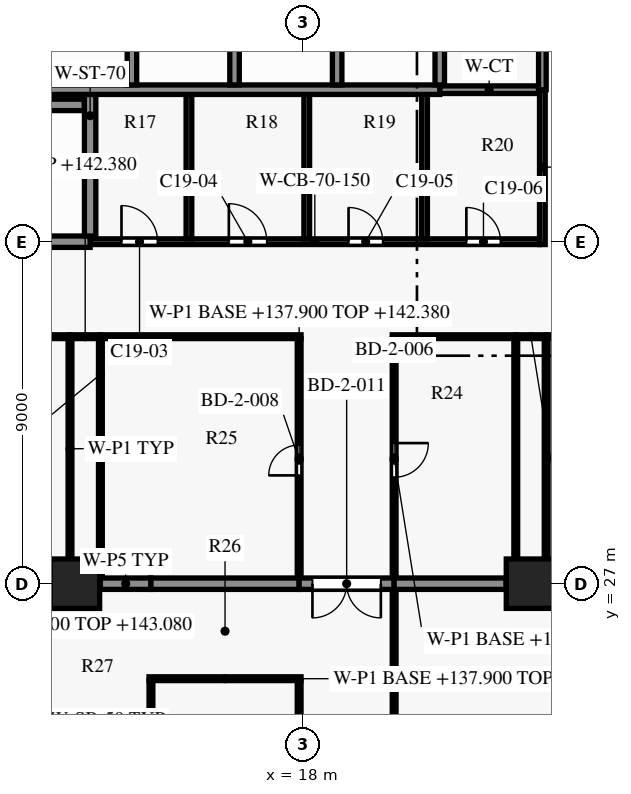
"""IFC4 building model, lengths in metres.
Left out: names, types, materials, properties, quantities, classifications, styles, units other than length and angle.
Written with IfcOpenShell. Run it as: python <this file> out.ifc"""

import sys

from ifc_helpers import new_model, si_unit, direction, frame, frame_2d, origin, origin_2d, place, context, subcontext, project, spatial, rectangle, extrude, element, fill, save


model = new_model("IFC4")
c1 = context("Model", 3, precision=1e-05, world=origin(), true_north=direction((0.0, 1.0)))
c2 = subcontext(c1, "Body", "Model", "MODEL_VIEW")
j1 = project(units=[si_unit("LENGTHUNIT", "METRE"), si_unit("PLANEANGLEUNIT", "RADIAN")], contexts=[c1])
p1 = place(None, origin())
s1 = spatial("IfcSite", under=j1, at=p1, CompositionType="ELEMENT")
p2 = place(p1, origin())
s2 = spatial("IfcBuilding", under=s1, at=p2, CompositionType="ELEMENT")
p3 = place(p2, frame((0.0, 0.0, 137.9)))
s3 = spatial("IfcBuildingStorey", under=s2, at=p3, CompositionType="ELEMENT", Elevation=137.9)
for number, where, z_axis, x_axis in (
    (1, (12.0, 27.0, 0.0), (0.0, 0.0, 1.0), (1.0, 0.0, 0.0)),
    (2, (24.0, 27.0, 0.0), (0.0, 0.0, 1.0), (1.0, 0.0, 0.0)),
):
    element("IfcColumn", number, at=place(p3, frame(where, z_axis=z_axis, x_axis=x_axis)), inside=s3, PredefinedType="COLUMN", context=c2, shape_type="SweptSolid", body=[
        extrude(rectangle(XDim=1.3, YDim=1.3, at=origin_2d()), origin(), (0.0, 0.0, 1.0), 5.5),
    ])
p4 = place(p3, frame((12.4, 36.0, 0.0), z_axis=(0.0, 0.0, 1.0), x_axis=(1.0, 0.0, 0.0)))
e3 = element("IfcWall", 3, at=p4, inside=s3, PredefinedType="SHEAR", context=c2, shape_type="SweptSolid", body=[
    extrude(rectangle(XDim=11.825, YDim=0.15, at=frame_2d((5.913, 0.0))), origin(), (0.0, 0.0, 1.0), 5.2),
])
p5 = place(p4, frame((0.825, 0.0, 0.0)))
e4 = element("IfcOpeningElement", 4, at=p5, cuts=e3, PredefinedType="OPENING", context=c2, shape_type="SweptSolid", body=[
    extrude(rectangle(XDim=0.95, YDim=2.1, at=frame_2d((0.475, 1.05))), frame((0.0, 0.085, 0.0), z_axis=(0.0, -1.0, 0.0), x_axis=(1.0, 0.0, 0.0)), (0.0, 0.0, 1.0), 0.17),
])
p6 = place(p4, frame((3.65, 0.0, 0.0)))
e5 = element("IfcOpeningElement", 5, at=p6, cuts=e3, PredefinedType="OPENING", context=c2, shape_type="SweptSolid", body=[
    extrude(rectangle(XDim=1.0, YDim=2.1, at=frame_2d((0.5, 1.05))), frame((0.0, 0.085, 0.0), z_axis=(0.0, -1.0, 0.0), x_axis=(1.0, 0.0, 0.0)), (0.0, 0.0, 1.0), 0.17),
])
p7 = place(p4, frame((6.8, 0.0, 0.0)))
e6 = element("IfcOpeningElement", 6, at=p7, cuts=e3, PredefinedType="OPENING", context=c2, shape_type="SweptSolid", body=[
    extrude(rectangle(XDim=0.9, YDim=2.1, at=frame_2d((0.45, 1.05))), frame((0.0, 0.085, 0.0), z_axis=(0.0, -1.0, 0.0), x_axis=(1.0, 0.0, 0.0)), (0.0, 0.0, 1.0), 0.17),
])
p8 = place(p4, frame((9.9, 0.0, 0.0)))
e7 = element("IfcOpeningElement", 7, at=p8, cuts=e3, PredefinedType="OPENING", context=c2, shape_type="SweptSolid", body=[
    extrude(rectangle(XDim=0.9, YDim=2.1, at=frame_2d((0.45, 1.05))), frame((0.0, 0.085, 0.0), z_axis=(0.0, -1.0, 0.0), x_axis=(1.0, 0.0, 0.0)), (0.0, 0.0, 1.0), 0.17),
])
p9 = place(p3, frame((4.55, 36.0, 0.0), z_axis=(0.0, 0.0, 1.0), x_axis=(1.0, 0.0, 0.0)))
e8 = element("IfcWall", 8, at=p9, inside=s3, PredefinedType="SHEAR", context=c2, shape_type="SweptSolid", body=[
    extrude(rectangle(XDim=7.85, YDim=0.3, at=frame_2d((3.925, 0.0))), origin(), (0.0, 0.0, 1.0), 5.2),
])
p10 = place(p9, frame((0.15, 0.0, 0.0)))
e9 = element("IfcOpeningElement", 9, at=p10, cuts=e8, PredefinedType="OPENING", context=c2, shape_type="SweptSolid", body=[
    extrude(rectangle(XDim=1.5, YDim=2.2, at=frame_2d((0.75, 1.1))), frame((0.0, 0.16, 0.0), z_axis=(0.0, -1.0, 0.0), x_axis=(1.0, 0.0, 0.0)), (0.0, 0.0, 1.0), 0.32),
])
p11 = place(p3, frame((4.55, 39.6, 0.0), z_axis=(0.0, 0.0, 1.0), x_axis=(1.0, 0.0, 0.0)))
e10 = element("IfcWall", 10, at=p11, inside=s3, PredefinedType="SHEAR", context=c2, shape_type="SweptSolid", body=[
    extrude(rectangle(XDim=7.7, YDim=0.3, at=frame_2d((3.85, 0.0))), origin(), (0.0, 0.0, 1.0), 5.2),
])
p12 = place(p3, frame((21.6, 40.0, 0.0), z_axis=(0.0, 0.0, 1.0), x_axis=(1.0, 0.0, 0.0)))
e11 = element("IfcWall", 11, at=p12, inside=s3, PredefinedType="PARTITIONING", context=c2, shape_type="SweptSolid", body=[
    extrude(rectangle(XDim=2.6, YDim=0.2, at=frame_2d((1.3, 0.0))), origin(), (0.0, 0.0, 1.0), 5.2),
])
p13 = place(p3, frame((0.125, 40.0, 0.0), z_axis=(0.0, 0.0, 1.0), x_axis=(1.0, 0.0, 0.0)))
e12 = element("IfcWall", 12, at=p13, inside=s3, PredefinedType="SHEAR", context=c2, shape_type="SweptSolid", body=[
    extrude(rectangle(XDim=21.475, YDim=0.25, at=frame_2d((10.738, 0.0))), origin(), (0.0, 0.0, 1.0), 5.2),
])
p14 = place(p3, frame((12.4, 36.15, 0.0), z_axis=(0.0, 0.0, 1.0), x_axis=(0.0, 1.0, 0.0)))
e13 = element("IfcWall", 13, at=p14, inside=s3, PredefinedType="SHEAR", context=c2, shape_type="SweptSolid", body=[
    extrude(rectangle(XDim=3.725, YDim=0.3, at=frame_2d((1.863, 0.0))), origin(), (0.0, 0.0, 1.0), 5.2),
])
p15 = place(p3, frame((13.5, 40.125, 0.0), z_axis=(0.0, 0.0, 1.0), x_axis=(0.0, 1.0, 0.0)))
e14 = element("IfcWall", 14, at=p15, inside=s3, PredefinedType="SHEAR", context=c2, shape_type="SweptSolid", body=[
    extrude(rectangle(XDim=2.95, YDim=0.25, at=frame_2d((1.475, 0.0))), origin(), (0.0, 0.0, 1.0), 5.2),
])
p16 = place(p3, frame((15.0, 36.075, 0.0), z_axis=(0.0, 0.0, 1.0), x_axis=(0.0, 1.0, 0.0)))
e15 = element("IfcWall", 15, at=p16, inside=s3, PredefinedType="PARTITIONING", context=c2, shape_type="SweptSolid", body=[
    extrude(rectangle(XDim=3.8, YDim=0.15, at=frame_2d((1.9, 0.0))), origin(), (0.0, 0.0, 1.0), 5.2),
])
p17 = place(p3, frame((16.2, 40.125, 0.0), z_axis=(0.0, 0.0, 1.0), x_axis=(0.0, 1.0, 0.0)))
e16 = element("IfcWall", 16, at=p17, inside=s3, PredefinedType="SHEAR", context=c2, shape_type="SweptSolid", body=[
    extrude(rectangle(XDim=2.95, YDim=0.25, at=frame_2d((1.475, 0.0))), origin(), (0.0, 0.0, 1.0), 5.2),
])
p18 = place(p3, frame((18.1, 36.075, 0.0), z_axis=(0.0, 0.0, 1.0), x_axis=(0.0, 1.0, 0.0)))
e17 = element("IfcWall", 17, at=p18, inside=s3, PredefinedType="PARTITIONING", context=c2, shape_type="SweptSolid", body=[
    extrude(rectangle(XDim=3.8, YDim=0.15, at=frame_2d((1.9, 0.0))), origin(), (0.0, 0.0, 1.0), 5.2),
])
p19 = place(p3, frame((18.9, 40.125, 0.0), z_axis=(0.0, 0.0, 1.0), x_axis=(0.0, 1.0, 0.0)))
e18 = element("IfcWall", 18, at=p19, inside=s3, PredefinedType="SHEAR", context=c2, shape_type="SweptSolid", body=[
    extrude(rectangle(XDim=2.95, YDim=0.25, at=frame_2d((1.475, 0.0))), origin(), (0.0, 0.0, 1.0), 5.2),
])
p20 = place(p3, frame((21.2, 36.075, 0.0), z_axis=(0.0, 0.0, 1.0), x_axis=(0.0, 1.0, 0.0)))
e19 = element("IfcWall", 19, at=p20, inside=s3, PredefinedType="PARTITIONING", context=c2, shape_type="SweptSolid", body=[
    extrude(rectangle(XDim=3.8, YDim=0.15, at=frame_2d((1.9, 0.0))), origin(), (0.0, 0.0, 1.0), 5.2),
])
p21 = place(p3, frame((21.6, 40.125, 0.0), z_axis=(0.0, 0.0, 1.0), x_axis=(0.0, 1.0, 0.0)))
e20 = element("IfcWall", 20, at=p21, inside=s3, PredefinedType="SHEAR", context=c2, shape_type="SweptSolid", body=[
    extrude(rectangle(XDim=2.95, YDim=0.25, at=frame_2d((1.475, 0.0))), origin(), (0.0, 0.0, 1.0), 5.2),
])
p22 = place(p3, frame((24.3, 35.925, 0.0), z_axis=(0.0, 0.0, 1.0), x_axis=(0.0, 1.0, 0.0)))
e21 = element("IfcWall", 21, at=p22, inside=s3, PredefinedType="SHEAR", context=c2, shape_type="SweptSolid", body=[
    extrude(rectangle(XDim=4.075, YDim=0.15, at=frame_2d((2.038, 0.0))), origin(), (0.0, 0.0, 1.0), 5.2),
])
p23 = place(p3, frame((24.3, 40.0, 0.0), z_axis=(0.0, 0.0, 1.0), x_axis=(0.0, 1.0, 0.0)))
e22 = element("IfcWall", 22, at=p23, inside=s3, PredefinedType="PARTITIONING", context=c2, shape_type="SweptSolid", body=[
    extrude(rectangle(XDim=3.3, YDim=0.2, at=frame_2d((1.65, 0.0))), origin(), (0.0, 0.0, 1.0), 5.2),
])
p24 = place(p3, frame((17.9, 18.2, 0.0), z_axis=(0.0, 0.0, 1.0), x_axis=(0.0, 1.0, 0.0)))
e23 = element("IfcWall", 23, at=p24, inside=s3, PredefinedType="PARTITIONING", context=c2, shape_type="SweptSolid", body=[
    extrude(rectangle(XDim=6.25, YDim=0.1, at=frame_2d((3.125, 0.0))), origin(), (0.0, 0.0, 1.0), 4.48),
])
p25 = place(p3, frame((14.0, 24.45, 0.0), z_axis=(0.0, 0.0, 1.0), x_axis=(0.0, -1.0, 0.0)))
e24 = element("IfcWall", 24, at=p25, inside=s3, PredefinedType="PARTITIONING", context=c2, shape_type="SweptSolid", body=[
    extrude(rectangle(XDim=6.25, YDim=0.1, at=frame_2d((3.125, 0.0))), origin(), (0.0, 0.0, 1.0), 5.18),
])
p26 = place(p3, frame((17.95, 24.5, 0.0), z_axis=(0.0, 0.0, 1.0), x_axis=(-1.0, 0.0, 0.0)))
e25 = element("IfcWall", 25, at=p26, inside=s3, PredefinedType="PARTITIONING", context=c2, shape_type="SweptSolid", body=[
    extrude(rectangle(XDim=4.0, YDim=0.1, at=frame_2d((2.0, 0.0))), origin(), (0.0, 0.0, 1.0), 4.48),
])
p27 = place(p3, frame((20.4, 26.83, 0.0), z_axis=(0.0, 0.0, 1.0), x_axis=(0.0, -1.0, 0.0)))
e26 = element("IfcWall", 26, at=p27, inside=s3, PredefinedType="PARTITIONING", context=c2, shape_type="SweptSolid", body=[
    extrude(rectangle(XDim=20.78, YDim=0.1, at=frame_2d((10.39, 0.0))), origin(), (0.0, 0.0, 1.0), 3.68),
])
p28 = place(p3, frame((12.67, 27.0, 0.0), z_axis=(0.0, 0.0, 1.0), x_axis=(1.0, 0.0, 0.0)))
e27 = element("IfcWall", 27, at=p28, inside=s3, PredefinedType="PARTITIONING", context=c2, shape_type="SweptSolid", body=[
    extrude(rectangle(XDim=1.33, YDim=0.3, at=frame_2d((0.665, 0.0))), origin(), (0.0, 0.0, 1.0), 4.48),
])
p29 = place(p3, frame((14.0, 27.0, 0.0), z_axis=(0.0, 0.0, 1.0), x_axis=(1.0, 0.0, 0.0)))
e28 = element("IfcWall", 28, at=p29, inside=s3, PredefinedType="PARTITIONING", context=c2, shape_type="SweptSolid", body=[
    extrude(rectangle(XDim=3.9, YDim=0.3, at=frame_2d((1.95, 0.0))), origin(), (0.0, 0.0, 1.0), 4.48),
])
p30 = place(p3, frame((20.4, 27.0, 0.0), z_axis=(0.0, 0.0, 1.0), x_axis=(-1.0, 0.0, 0.0)))
e29 = element("IfcWall", 29, at=p30, inside=s3, PredefinedType="PARTITIONING", context=c2, shape_type="SweptSolid", body=[
    extrude(rectangle(XDim=2.5, YDim=0.3, at=frame_2d((1.25, 0.0))), origin(), (0.0, 0.0, 1.0), 4.48),
])
p31 = place(p30, frame((0.35, 0.0, 0.0)))
e30 = element("IfcOpeningElement", 30, at=p31, cuts=e29, PredefinedType="OPENING", context=c2, shape_type="SweptSolid", body=[
    extrude(rectangle(XDim=1.8, YDim=2.1, at=frame_2d((0.9, 1.05))), frame((0.0, 0.16, 0.0), z_axis=(0.0, -1.0, 0.0), x_axis=(1.0, 0.0, 0.0)), (0.0, 0.0, 1.0), 0.32),
])
p32 = place(p3, frame((23.345, 27.0, 0.0), z_axis=(0.0, 0.0, 1.0), x_axis=(-1.0, 0.0, 0.0)))
e31 = element("IfcWall", 31, at=p32, inside=s3, PredefinedType="PARTITIONING", context=c2, shape_type="SweptSolid", body=[
    extrude(rectangle(XDim=2.945, YDim=0.3, at=frame_2d((1.473, 0.0))), origin(), (0.0, 0.0, 1.0), 4.48),
])
p33 = place(p3, frame((12.67, 27.17, 0.0), z_axis=(0.0, 0.0, 1.0), x_axis=(0.0, 1.0, 0.0)))
e32 = element("IfcWall", 32, at=p33, inside=s3, PredefinedType="PARTITIONING", context=c2, shape_type="SweptSolid", body=[
    extrude(rectangle(XDim=6.28, YDim=0.1, at=frame_2d((3.14, 0.0))), origin(), (0.0, 0.0, 1.0), 4.48),
])
p34 = place(p3, frame((17.9, 27.17, 0.0), z_axis=(0.0, 0.0, 1.0), x_axis=(0.0, 1.0, 0.0)))
e33 = element("IfcWall", 33, at=p34, inside=s3, PredefinedType="PARTITIONING", context=c2, shape_type="SweptSolid", body=[
    extrude(rectangle(XDim=6.28, YDim=0.1, at=frame_2d((3.14, 0.0))), origin(), (0.0, 0.0, 1.0), 4.48),
])
p35 = place(p34, frame((2.68, 0.0, 0.0)))
e34 = element("IfcOpeningElement", 34, at=p35, cuts=e33, PredefinedType="OPENING", context=c2, shape_type="SweptSolid", body=[
    extrude(rectangle(XDim=0.8, YDim=2.1, at=frame_2d((0.4, 1.05))), frame((0.0, 0.06, 0.0), z_axis=(0.0, -1.0, 0.0), x_axis=(1.0, 0.0, 0.0)), (0.0, 0.0, 1.0), 0.12),
])
for number, where, z_axis, x_axis in (
    (35, (24.4, 27.655, 0.0), (0.0, 0.0, 1.0), (0.0, 1.0, 0.0)),
    (36, (11.87, 33.45, 0.0), (0.0, 0.0, 1.0), (0.0, -1.0, 0.0)),
):
    element("IfcWall", number, at=place(p3, frame(where, z_axis=z_axis, x_axis=x_axis)), inside=s3, PredefinedType="PARTITIONING", context=c2, shape_type="SweptSolid", body=[
        extrude(rectangle(XDim=5.795, YDim=0.1, at=frame_2d((2.897, 0.0))), origin(), (0.0, 0.0, 1.0), 5.18),
    ])
p36 = place(p3, frame((20.4, 33.45, 0.0), z_axis=(0.0, 0.0, 1.0), x_axis=(0.0, -1.0, 0.0)))
e37 = element("IfcWall", 37, at=p36, inside=s3, PredefinedType="PARTITIONING", context=c2, shape_type="SweptSolid", body=[
    extrude(rectangle(XDim=6.28, YDim=0.1, at=frame_2d((3.14, 0.0))), origin(), (0.0, 0.0, 1.0), 4.48),
])
p37 = place(p36, frame((2.75, 0.0, 0.0)))
e38 = element("IfcOpeningElement", 38, at=p37, cuts=e37, PredefinedType="OPENING", context=c2, shape_type="SweptSolid", body=[
    extrude(rectangle(XDim=0.9, YDim=2.1, at=frame_2d((0.45, 1.05))), frame((0.0, 0.06, 0.0), z_axis=(0.0, -1.0, 0.0), x_axis=(1.0, 0.0, 0.0)), (0.0, 0.0, 1.0), 0.12),
])
p38 = place(p3, frame((23.6, 33.45, 0.0), z_axis=(0.0, 0.0, 1.0), x_axis=(0.0, -1.0, 0.0)))
e39 = element("IfcWall", 39, at=p38, inside=s3, PredefinedType="PARTITIONING", context=c2, shape_type="SweptSolid", body=[
    extrude(rectangle(XDim=5.795, YDim=0.1, at=frame_2d((2.897, 0.0))), origin(), (0.0, 0.0, 1.0), 5.18),
])
p39 = place(p3, frame((11.87, 33.5, 0.0), z_axis=(0.0, 0.0, 1.0), x_axis=(-1.0, 0.0, 0.0)))
e40 = element("IfcWall", 40, at=p39, inside=s3, PredefinedType="PARTITIONING", context=c2, shape_type="SweptSolid", body=[
    extrude(rectangle(XDim=5.42, YDim=0.1, at=frame_2d((2.71, 0.0))), origin(), (0.0, 0.0, 1.0), 5.18),
])
p40 = place(p39, frame((2.395, 0.0, 0.0)))
e41 = element("IfcOpeningElement", 41, at=p40, cuts=e40, PredefinedType="OPENING", context=c2, shape_type="SweptSolid", body=[
    extrude(rectangle(XDim=0.8, YDim=2.1, at=frame_2d((0.4, 1.05))), frame((0.0, 0.06, 0.0), z_axis=(0.0, -1.0, 0.0), x_axis=(1.0, 0.0, 0.0)), (0.0, 0.0, 1.0), 0.12),
])
p41 = place(p3, frame((12.67, 33.5, 0.0), z_axis=(0.0, 0.0, 1.0), x_axis=(-1.0, 0.0, 0.0)))
e42 = element("IfcWall", 42, at=p41, inside=s3, PredefinedType="PARTITIONING", context=c2, shape_type="SweptSolid", body=[
    extrude(rectangle(XDim=0.8, YDim=0.1, at=frame_2d((0.4, 0.0))), origin(), (0.0, 0.0, 1.0), 4.48),
])
p42 = place(p3, frame((17.95, 33.5, 0.0), z_axis=(0.0, 0.0, 1.0), x_axis=(-1.0, 0.0, 0.0)))
e43 = element("IfcWall", 43, at=p42, inside=s3, PredefinedType="PARTITIONING", context=c2, shape_type="SweptSolid", body=[
    extrude(rectangle(XDim=5.28, YDim=0.1, at=frame_2d((2.64, 0.0))), origin(), (0.0, 0.0, 1.0), 5.18),
])
p43 = place(p3, frame((23.6, 33.5, 0.0), z_axis=(0.0, 0.0, 1.0), x_axis=(-1.0, 0.0, 0.0)))
e44 = element("IfcWall", 44, at=p43, inside=s3, PredefinedType="PARTITIONING", context=c2, shape_type="SweptSolid", body=[
    extrude(rectangle(XDim=3.25, YDim=0.1, at=frame_2d((1.625, 0.0))), origin(), (0.0, 0.0, 1.0), 5.18),
])
p44 = place(p3, frame((24.4, 33.5, 0.0), z_axis=(0.0, 0.0, 1.0), x_axis=(-1.0, 0.0, 0.0)))
e45 = element("IfcWall", 45, at=p44, inside=s3, PredefinedType="PARTITIONING", context=c2, shape_type="SweptSolid", body=[
    extrude(rectangle(XDim=0.8, YDim=0.1, at=frame_2d((0.4, 0.0))), origin(), (0.0, 0.0, 1.0), 4.48),
])
p45 = place(p3, frame((31.55, 33.5, 0.0), z_axis=(0.0, 0.0, 1.0), x_axis=(-1.0, 0.0, 0.0)))
e46 = element("IfcWall", 46, at=p45, inside=s3, PredefinedType="PARTITIONING", context=c2, shape_type="SweptSolid", body=[
    extrude(rectangle(XDim=7.15, YDim=0.1, at=frame_2d((3.575, 0.0))), origin(), (0.0, 0.0, 1.0), 5.18),
])
p46 = place(p45, frame((3.15, 0.0, 0.0)))
e47 = element("IfcOpeningElement", 47, at=p46, cuts=e46, PredefinedType="OPENING", context=c2, shape_type="SweptSolid", body=[
    extrude(rectangle(XDim=0.9, YDim=2.1, at=frame_2d((0.45, 1.05))), frame((0.0, 0.06, 0.0), z_axis=(0.0, -1.0, 0.0), x_axis=(1.0, 0.0, 0.0)), (0.0, 0.0, 1.0), 0.12),
])
p47 = place(p5, origin())
e48 = element("IfcDoor", 48, at=p47, inside=s3, OperationType="SINGLE_SWING_RIGHT", PredefinedType="DOOR", context=c2, shape_type="SweptSolid", body=[
    extrude(rectangle(XDim=0.95, YDim=2.1, at=frame_2d((0.475, 1.05))), frame((0.0, 0.025, 0.0), z_axis=(0.0, -1.0, 0.0), x_axis=(1.0, 0.0, 0.0)), (0.0, 0.0, 1.0), 0.05),
])
fill(e4, e48)
p48 = place(p6, origin())
e49 = element("IfcDoor", 49, at=p48, inside=s3, OperationType="SINGLE_SWING_LEFT", PredefinedType="DOOR", context=c2, shape_type="SweptSolid", body=[
    extrude(rectangle(XDim=1.0, YDim=2.1, at=frame_2d((0.5, 1.05))), frame((0.0, 0.025, 0.0), z_axis=(0.0, -1.0, 0.0), x_axis=(1.0, 0.0, 0.0)), (0.0, 0.0, 1.0), 0.05),
])
fill(e5, e49)
p49 = place(p7, origin())
e50 = element("IfcDoor", 50, at=p49, inside=s3, OperationType="SINGLE_SWING_RIGHT", PredefinedType="DOOR", context=c2, shape_type="SweptSolid", body=[
    extrude(rectangle(XDim=0.9, YDim=2.1, at=frame_2d((0.45, 1.05))), frame((0.0, 0.025, 0.0), z_axis=(0.0, -1.0, 0.0), x_axis=(1.0, 0.0, 0.0)), (0.0, 0.0, 1.0), 0.05),
])
fill(e6, e50)
p50 = place(p8, origin())
e51 = element("IfcDoor", 51, at=p50, inside=s3, OperationType="SINGLE_SWING_LEFT", PredefinedType="DOOR", context=c2, shape_type="SweptSolid", body=[
    extrude(rectangle(XDim=0.9, YDim=2.1, at=frame_2d((0.45, 1.05))), frame((0.0, 0.025, 0.0), z_axis=(0.0, -1.0, 0.0), x_axis=(1.0, 0.0, 0.0)), (0.0, 0.0, 1.0), 0.05),
])
fill(e7, e51)
p51 = place(p37, origin())
e52 = element("IfcDoor", 52, at=p51, inside=s3, OperationType="SINGLE_SWING_LEFT", PredefinedType="DOOR", context=c2, shape_type="SweptSolid", body=[
    extrude(rectangle(XDim=0.9, YDim=2.1, at=frame_2d((0.45, 1.05))), frame((0.0, 0.025, 0.0), z_axis=(0.0, -1.0, 0.0), x_axis=(1.0, 0.0, 0.0)), (0.0, 0.0, 1.0), 0.05),
])
fill(e38, e52)
p52 = place(p35, origin())
e53 = element("IfcDoor", 53, at=p52, inside=s3, OperationType="SINGLE_SWING_RIGHT", PredefinedType="DOOR", context=c2, shape_type="SweptSolid", body=[
    extrude(rectangle(XDim=0.8, YDim=2.1, at=frame_2d((0.4, 1.05))), frame((0.0, 0.025, 0.0), z_axis=(0.0, -1.0, 0.0), x_axis=(1.0, 0.0, 0.0)), (0.0, 0.0, 1.0), 0.05),
])
fill(e34, e53)
p53 = place(p31, origin())
e54 = element("IfcDoor", 54, at=p53, inside=s3, OperationType="DOUBLE_DOOR_SINGLE_SWING", PredefinedType="DOOR", context=c2, shape_type="SweptSolid", body=[
    extrude(rectangle(XDim=1.8, YDim=2.1, at=frame_2d((0.9, 1.05))), frame((0.0, 0.025, 0.0), z_axis=(0.0, -1.0, 0.0), x_axis=(1.0, 0.0, 0.0)), (0.0, 0.0, 1.0), 0.05),
])
fill(e30, e54)
save(model, sys.argv[1])
